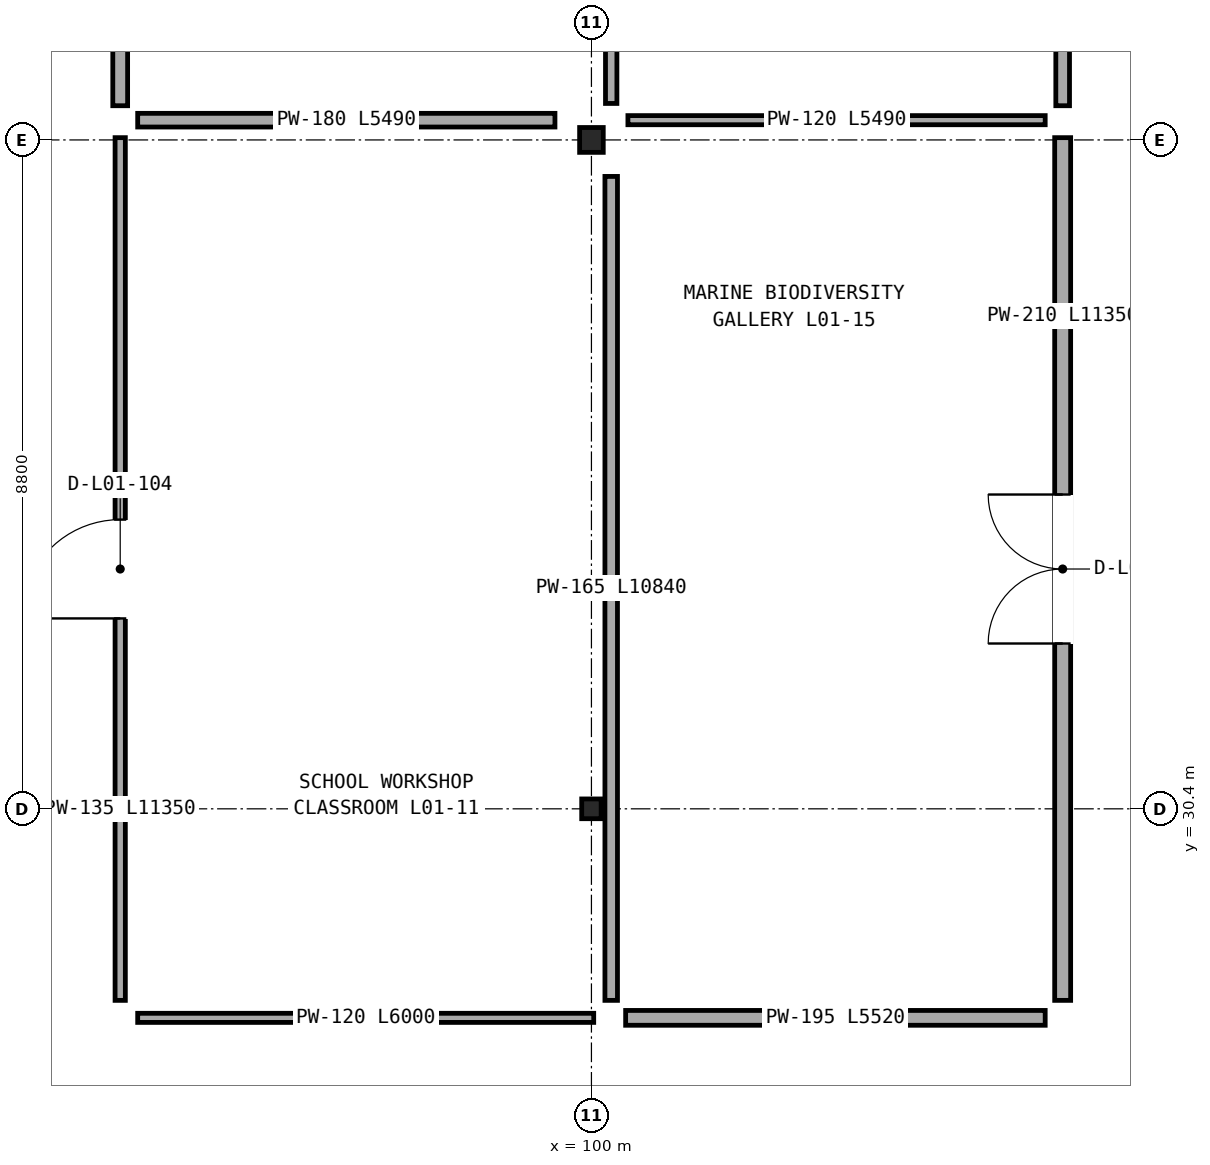
"""IFC4 building model, lengths in metres.
Left out: names, types, materials, properties, quantities, classifications, styles, units other than length and angle.
Written with IfcOpenShell. Run it as: python <this file> out.ifc"""

import sys

from ifc_helpers import new_model, si_unit, direction, frame, frame_2d, origin, origin_2d, place, context, subcontext, project, spatial, rectangle, i_section, extrude, element, fill, save


model = new_model("IFC4")
c1 = context("Model", 3, precision=1e-05, world=origin(), true_north=direction((0.0, 1.0)))
c2 = subcontext(c1, "Body", "Model", "MODEL_VIEW")
j1 = project(units=[si_unit("LENGTHUNIT", "METRE"), si_unit("PLANEANGLEUNIT", "RADIAN")], contexts=[c1])
p1 = place(None, origin())
s1 = spatial("IfcSite", under=j1, at=p1, CompositionType="ELEMENT")
p2 = place(p1, origin())
s2 = spatial("IfcBuilding", under=s1, at=p2, CompositionType="ELEMENT")
p3 = place(p2, frame((0.0, 0.0, 5.6)))
s3 = spatial("IfcBuildingStorey", under=s2, at=p3, CompositionType="ELEMENT", Elevation=5.6)
p4 = place(p3, frame((100.0, 30.4, 0.0), z_axis=(0.0, 0.0, 1.0), x_axis=(1.0, 0.0, 0.0)))
e1 = element("IfcColumn", 1, at=p4, inside=s3, PredefinedType="COLUMN", context=c2, shape_type="SweptSolid", body=[
    extrude(i_section(OverallWidth=0.256, OverallDepth=0.26, WebThickness=0.01, FlangeThickness=0.017, FilletRadius=0.013, at=origin_2d()), origin(), (0.0, 0.0, 1.0), 4.5),
])
p5 = place(p3, frame((100.0, 39.2, 0.0), z_axis=(0.0, 0.0, 1.0), x_axis=(1.0, 0.0, 0.0)))
e2 = element("IfcColumn", 2, at=p5, inside=s3, PredefinedType="COLUMN", context=c2, shape_type="SweptSolid", body=[
    extrude(i_section(OverallWidth=0.311, OverallDepth=0.327, WebThickness=0.016, FlangeThickness=0.025, FilletRadius=0.017, at=origin_2d()), origin(), (0.0, 0.0, 1.0), 4.5),
])
p6 = place(p3, frame((93.8, 27.88, 0.0), z_axis=(0.0, 0.0, 1.0), x_axis=(0.0, 1.0, 0.0)))
e3 = element("IfcWall", 3, at=p6, inside=s3, PredefinedType="PARTITIONING", context=c2, shape_type="SweptSolid", body=[
    extrude(rectangle(XDim=11.35, YDim=0.135, at=frame_2d((5.675, 0.0))), origin(), (0.0, 0.0, 1.0), 3.613),
])
p7 = place(p6, frame((5.025, 0.0, 0.0)))
e4 = element("IfcOpeningElement", 4, at=p7, cuts=e3, PredefinedType="OPENING", context=c2, shape_type="SweptSolid", body=[
    extrude(rectangle(XDim=1.3, YDim=2.46, at=frame_2d((0.65, 1.23))), frame((0.0, 0.078, 0.0), z_axis=(0.0, -1.0, 0.0), x_axis=(1.0, 0.0, 0.0)), (0.0, 0.0, 1.0), 0.155),
])
p8 = place(p3, frame((100.03, 27.65, 0.0), z_axis=(0.0, 0.0, 1.0), x_axis=(-1.0, 0.0, 0.0)))
e5 = element("IfcWall", 5, at=p8, inside=s3, PredefinedType="PARTITIONING", context=c2, shape_type="SweptSolid", body=[
    extrude(rectangle(XDim=6.0, YDim=0.12, at=frame_2d((3.0, 0.0))), origin(), (0.0, 0.0, 1.0), 3.803),
])
p9 = place(p3, frame((93.8, 39.65, 0.0), z_axis=(0.0, 0.0, 1.0), x_axis=(0.0, 1.0, 0.0)))
e6 = element("IfcWall", 6, at=p9, inside=s3, PredefinedType="PARTITIONING", context=c2, shape_type="SweptSolid", body=[
    extrude(rectangle(XDim=11.27, YDim=0.195, at=frame_2d((5.635, 0.0))), origin(), (0.0, 0.0, 1.0), 3.613),
])
p10 = place(p3, frame((106.2, 39.23, 0.0), z_axis=(0.0, 0.0, 1.0), x_axis=(0.0, -1.0, 0.0)))
e7 = element("IfcWall", 7, at=p10, inside=s3, PredefinedType="PARTITIONING", context=c2, shape_type="SweptSolid", body=[
    extrude(rectangle(XDim=11.35, YDim=0.21, at=frame_2d((5.675, 0.0))), origin(), (0.0, 0.0, 1.0), 3.613),
])
p11 = place(p10, frame((4.695, 0.0, 0.0)))
e8 = element("IfcOpeningElement", 8, at=p11, cuts=e7, PredefinedType="OPENING", context=c2, shape_type="SweptSolid", body=[
    extrude(rectangle(XDim=1.96, YDim=2.46, at=frame_2d((0.98, 1.23))), frame((0.0, 0.115, 0.0), z_axis=(0.0, -1.0, 0.0), x_axis=(1.0, 0.0, 0.0)), (0.0, 0.0, 1.0), 0.23),
])
p12 = place(p3, frame((105.97, 27.65, 0.0), z_axis=(0.0, 0.0, 1.0), x_axis=(-1.0, 0.0, 0.0)))
e9 = element("IfcWall", 9, at=p12, inside=s3, PredefinedType="PARTITIONING", context=c2, shape_type="SweptSolid", body=[
    extrude(rectangle(XDim=5.52, YDim=0.195, at=frame_2d((2.76, 0.0))), origin(), (0.0, 0.0, 1.0), 4.053),
])
p13 = place(p3, frame((106.2, 50.92, 0.0), z_axis=(0.0, 0.0, 1.0), x_axis=(0.0, -1.0, 0.0)))
e10 = element("IfcWall", 10, at=p13, inside=s3, PredefinedType="PARTITIONING", context=c2, shape_type="SweptSolid", body=[
    extrude(rectangle(XDim=11.27, YDim=0.18, at=frame_2d((5.635, 0.0))), origin(), (0.0, 0.0, 1.0), 3.613),
])
p14 = place(p13, frame((4.565, 0.0, 0.0)))
e11 = element("IfcOpeningElement", 11, at=p14, cuts=e10, PredefinedType="OPENING", context=c2, shape_type="SweptSolid", body=[
    extrude(rectangle(XDim=2.14, YDim=2.46, at=frame_2d((1.07, 1.23))), frame((0.0, 0.1, 0.0), z_axis=(0.0, -1.0, 0.0), x_axis=(1.0, 0.0, 0.0)), (0.0, 0.0, 1.0), 0.2),
])
p15 = place(p3, frame((94.03, 39.46, 0.0), z_axis=(0.0, 0.0, 1.0), x_axis=(1.0, 0.0, 0.0)))
e12 = element("IfcWall", 12, at=p15, inside=s3, PredefinedType="PARTITIONING", context=c2, shape_type="SweptSolid", body=[
    extrude(rectangle(XDim=5.49, YDim=0.18, at=frame_2d((2.745, 0.0))), origin(), (0.0, 0.0, 1.0), 3.613),
])
p16 = place(p3, frame((100.26, 38.72, 0.0), z_axis=(0.0, 0.0, 1.0), x_axis=(0.0, -1.0, 0.0)))
e13 = element("IfcWall", 13, at=p16, inside=s3, PredefinedType="PARTITIONING", context=c2, shape_type="SweptSolid", body=[
    extrude(rectangle(XDim=10.84, YDim=0.165, at=frame_2d((5.42, 0.0))), origin(), (0.0, 0.0, 1.0), 3.653),
])
p17 = place(p3, frame((100.26, 50.92, 0.0), z_axis=(0.0, 0.0, 1.0), x_axis=(0.0, -1.0, 0.0)))
e14 = element("IfcWall", 14, at=p17, inside=s3, PredefinedType="PARTITIONING", context=c2, shape_type="SweptSolid", body=[
    extrude(rectangle(XDim=11.24, YDim=0.15, at=frame_2d((5.62, 0.0))), origin(), (0.0, 0.0, 1.0), 3.613),
])
p18 = place(p3, frame((100.48, 39.46, 0.0), z_axis=(0.0, 0.0, 1.0), x_axis=(1.0, 0.0, 0.0)))
e15 = element("IfcWall", 15, at=p18, inside=s3, PredefinedType="PARTITIONING", context=c2, shape_type="SweptSolid", body=[
    extrude(rectangle(XDim=5.49, YDim=0.12, at=frame_2d((2.745, 0.0))), origin(), (0.0, 0.0, 1.0), 3.613),
])
p19 = place(p7, origin())
e16 = element("IfcDoor", 16, at=p19, inside=s3, OperationType="SINGLE_SWING_LEFT", PredefinedType="DOOR", context=c2, shape_type="SweptSolid", body=[
    extrude(rectangle(XDim=1.3, YDim=2.46, at=frame_2d((0.65, 1.23))), frame((0.0, 0.025, 0.0), z_axis=(0.0, -1.0, 0.0), x_axis=(1.0, 0.0, 0.0)), (0.0, 0.0, 1.0), 0.05),
])
fill(e4, e16)
p20 = place(p11, frame((1.96, 0.0, 0.0), z_axis=(0.0, 0.0, 1.0), x_axis=(-1.0, 0.0, 0.0)))
e17 = element("IfcDoor", 17, at=p20, inside=s3, OperationType="DOUBLE_DOOR_SINGLE_SWING", PredefinedType="DOOR", context=c2, shape_type="SweptSolid", body=[
    extrude(rectangle(XDim=1.96, YDim=2.46, at=frame_2d((0.98, 1.23))), frame((0.0, 0.025, 0.0), z_axis=(0.0, -1.0, 0.0), x_axis=(1.0, 0.0, 0.0)), (0.0, 0.0, 1.0), 0.05),
])
fill(e8, e17)
save(model, sys.argv[1])
